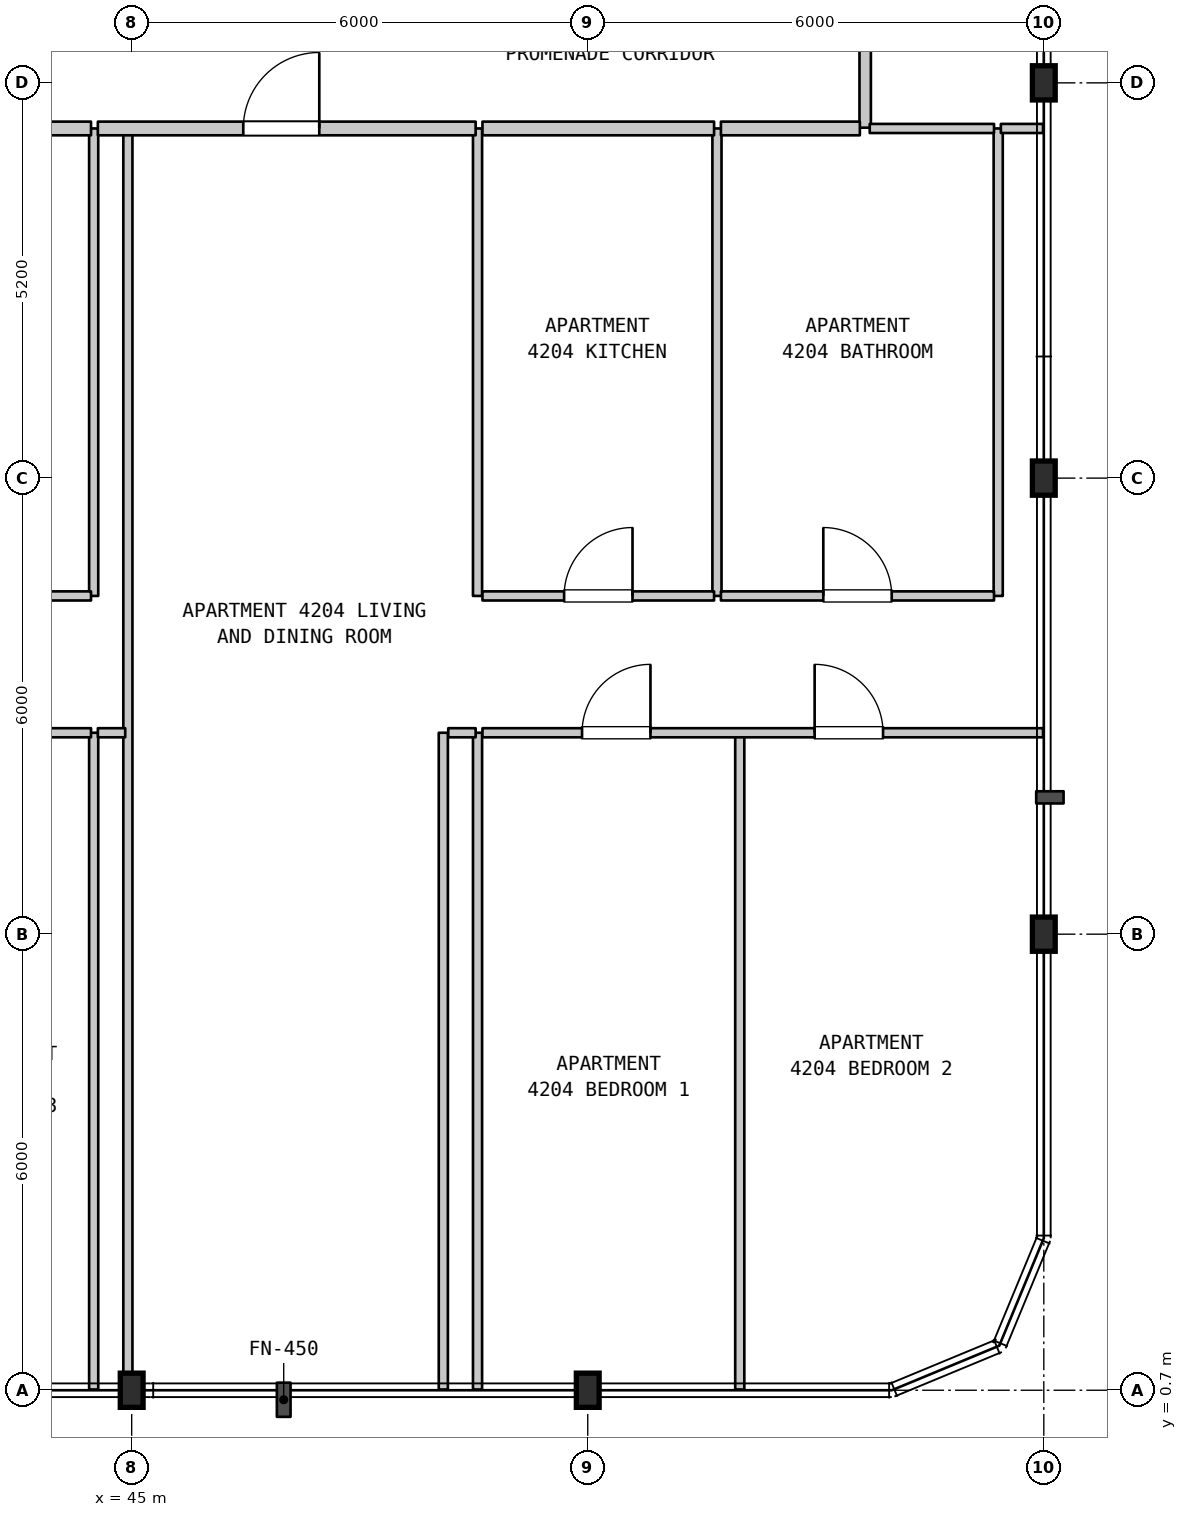
"""IFC4 building model, lengths in metres.
Left out: names, types, materials, properties, quantities, classifications, styles, units other than length and angle.
Written with IfcOpenShell. Run it as: python <this file> out.ifc"""

import sys

from ifc_helpers import new_model, si_unit, direction, frame, frame_2d, origin, origin_2d, place, context, subcontext, project, spatial, rectangle, i_section, extrude, element, fill, save


model = new_model("IFC4")
c1 = context("Model", 3, precision=1e-05, world=origin(), true_north=direction((0.0, 1.0)))
c2 = subcontext(c1, "Body", "Model", "MODEL_VIEW")
j1 = project(units=[si_unit("LENGTHUNIT", "METRE"), si_unit("PLANEANGLEUNIT", "RADIAN")], contexts=[c1])
p1 = place(None, origin())
s1 = spatial("IfcSite", under=j1, at=p1, CompositionType="ELEMENT")
p2 = place(p1, origin())
s2 = spatial("IfcBuilding", under=s1, at=p2, CompositionType="ELEMENT")
p3 = place(p2, frame((0.0, 0.0, 172.8)))
s3 = spatial("IfcBuildingStorey", under=s2, at=p3, CompositionType="ELEMENT", Elevation=172.8)
for number, where, z_axis, x_axis in (
    (1, (45.0, 0.7, 0.0), (0.0, 0.0, 1.0), (1.0, 0.0, 0.0)),
    (2, (51.0, 0.7, 0.0), (0.0, 0.0, 1.0), (1.0, 0.0, 0.0)),
    (3, (57.0, 6.7, 0.0), (0.0, 0.0, 1.0), (1.0, 0.0, 0.0)),
    (4, (57.0, 12.7, 0.0), (0.0, 0.0, 1.0), (1.0, 0.0, 0.0)),
    (5, (57.0, 17.9, 0.0), (0.0, 0.0, 1.0), (1.0, 0.0, 0.0)),
):
    element("IfcColumn", number, at=place(p3, frame(where, z_axis=z_axis, x_axis=x_axis)), inside=s3, PredefinedType="COLUMN", context=c2, shape_type="SweptSolid", body=[
        extrude(i_section(OverallWidth=0.3, OverallDepth=0.45, WebThickness=0.014, FlangeThickness=0.026, FilletRadius=0.027, at=origin_2d()), origin(), (0.0, 0.0, 1.0), 3.7),
    ])
p4 = place(p3, frame((44.5, 0.71, 0.0), z_axis=(0.0, 0.0, 1.0), x_axis=(0.0, 1.0, 0.0)))
e6 = element("IfcWall", 6, at=p4, inside=s3, PredefinedType="PARTITIONING", context=c2, shape_type="SweptSolid", body=[
    extrude(rectangle(XDim=8.64, YDim=0.12, at=frame_2d((4.32, 0.0))), origin(), (0.0, 0.0, 1.0), 3.39),
])
p5 = place(p3, frame((44.5, 11.15, 0.0), z_axis=(0.0, 0.0, 1.0), x_axis=(0.0, 1.0, 0.0)))
e7 = element("IfcWall", 7, at=p5, inside=s3, PredefinedType="PARTITIONING", context=c2, shape_type="SweptSolid", body=[
    extrude(rectangle(XDim=6.15, YDim=0.12, at=frame_2d((3.075, 0.0))), origin(), (0.0, 0.0, 1.0), 3.39),
])
p6 = place(p3, frame((44.95, 0.71, 0.0), z_axis=(0.0, 0.0, 1.0), x_axis=(0.0, 1.0, 0.0)))
e8 = element("IfcWall", 8, at=p6, inside=s3, PredefinedType="PARTITIONING", context=c2, shape_type="SweptSolid", body=[
    extrude(rectangle(XDim=16.59, YDim=0.12, at=frame_2d((8.295, 0.0))), origin(), (0.0, 0.0, 1.0), 3.39),
])
for number, where, z_axis, x_axis in (
    (9, (49.1, 0.71, 0.0), (0.0, 0.0, 1.0), (0.0, 1.0, 0.0)),
    (10, (49.55, 0.71, 0.0), (0.0, 0.0, 1.0), (0.0, 1.0, 0.0)),
):
    element("IfcWall", number, at=place(p3, frame(where, z_axis=z_axis, x_axis=x_axis)), inside=s3, PredefinedType="PARTITIONING", context=c2, shape_type="SweptSolid", body=[
        extrude(rectangle(XDim=8.64, YDim=0.12, at=frame_2d((4.32, 0.0))), origin(), (0.0, 0.0, 1.0), 3.39),
    ])
for number, where, z_axis, x_axis in (
    (11, (49.55, 11.15, 0.0), (0.0, 0.0, 1.0), (0.0, 1.0, 0.0)),
    (12, (52.7, 11.15, 0.0), (0.0, 0.0, 1.0), (0.0, 1.0, 0.0)),
):
    element("IfcWall", number, at=place(p3, frame(where, z_axis=z_axis, x_axis=x_axis)), inside=s3, PredefinedType="PARTITIONING", context=c2, shape_type="SweptSolid", body=[
        extrude(rectangle(XDim=6.15, YDim=0.12, at=frame_2d((3.075, 0.0))), origin(), (0.0, 0.0, 1.0), 3.39),
    ])
p7 = place(p3, frame((53.0, 0.71, 0.0), z_axis=(0.0, 0.0, 1.0), x_axis=(0.0, 1.0, 0.0)))
e13 = element("IfcWall", 13, at=p7, inside=s3, PredefinedType="PARTITIONING", context=c2, shape_type="SweptSolid", body=[
    extrude(rectangle(XDim=8.64, YDim=0.12, at=frame_2d((4.32, 0.0))), origin(), (0.0, 0.0, 1.0), 3.39),
])
p8 = place(p3, frame((54.65, 17.31, 0.0), z_axis=(0.0, 0.0, 1.0), x_axis=(0.0, 1.0, 0.0)))
e14 = element("IfcWall", 14, at=p8, inside=s3, PredefinedType="STANDARD", context=c2, shape_type="SweptSolid", body=[
    extrude(rectangle(XDim=2.19, YDim=0.15, at=frame_2d((1.095, 0.0))), origin(), (0.0, 0.0, 1.0), 3.39),
])
p9 = place(p3, frame((56.4, 11.15, 0.0), z_axis=(0.0, 0.0, 1.0), x_axis=(0.0, 1.0, 0.0)))
e15 = element("IfcWall", 15, at=p9, inside=s3, PredefinedType="PARTITIONING", context=c2, shape_type="SweptSolid", body=[
    extrude(rectangle(XDim=6.15, YDim=0.12, at=frame_2d((3.075, 0.0))), origin(), (0.0, 0.0, 1.0), 3.39),
])
p10 = place(p3, frame((37.425, 9.35, 0.0), z_axis=(0.0, 0.0, 1.0), x_axis=(1.0, 0.0, 0.0)))
e16 = element("IfcWall", 16, at=p10, inside=s3, PredefinedType="PARTITIONING", context=c2, shape_type="SweptSolid", body=[
    extrude(rectangle(XDim=7.04, YDim=0.12, at=frame_2d((3.52, 0.0))), origin(), (0.0, 0.0, 1.0), 3.39),
])
p11 = place(p10, frame((0.868, 0.0, 0.0)))
e17 = element("IfcOpeningElement", 17, at=p11, cuts=e16, PredefinedType="OPENING", context=c2, shape_type="SweptSolid", body=[
    extrude(rectangle(XDim=0.9, YDim=2.15, at=frame_2d((0.45, 1.075))), frame((0.0, 0.07, 0.0), z_axis=(0.0, -1.0, 0.0), x_axis=(1.0, 0.0, 0.0)), (0.0, 0.0, 1.0), 0.14),
])
p12 = place(p10, frame((2.999, 0.0, 0.0)))
e18 = element("IfcOpeningElement", 18, at=p12, cuts=e16, PredefinedType="OPENING", context=c2, shape_type="SweptSolid", body=[
    extrude(rectangle(XDim=0.9, YDim=2.15, at=frame_2d((0.45, 1.075))), frame((0.0, 0.07, 0.0), z_axis=(0.0, -1.0, 0.0), x_axis=(1.0, 0.0, 0.0)), (0.0, 0.0, 1.0), 0.14),
])
p13 = place(p10, frame((5.272, 0.0, 0.0)))
e19 = element("IfcOpeningElement", 19, at=p13, cuts=e16, PredefinedType="OPENING", context=c2, shape_type="SweptSolid", body=[
    extrude(rectangle(XDim=0.9, YDim=2.15, at=frame_2d((0.45, 1.075))), frame((0.0, 0.07, 0.0), z_axis=(0.0, -1.0, 0.0), x_axis=(1.0, 0.0, 0.0)), (0.0, 0.0, 1.0), 0.14),
])
p14 = place(p3, frame((44.555, 9.35, 0.0), z_axis=(0.0, 0.0, 1.0), x_axis=(1.0, 0.0, 0.0)))
e20 = element("IfcWall", 20, at=p14, inside=s3, PredefinedType="PARTITIONING", context=c2, shape_type="SweptSolid", body=[
    extrude(rectangle(XDim=0.36, YDim=0.12, at=frame_2d((0.18, 0.0))), origin(), (0.0, 0.0, 1.0), 3.39),
])
p15 = place(p3, frame((49.165, 9.35, 0.0), z_axis=(0.0, 0.0, 1.0), x_axis=(1.0, 0.0, 0.0)))
e21 = element("IfcWall", 21, at=p15, inside=s3, PredefinedType="PARTITIONING", context=c2, shape_type="SweptSolid", body=[
    extrude(rectangle(XDim=0.36, YDim=0.12, at=frame_2d((0.18, 0.0))), origin(), (0.0, 0.0, 1.0), 3.39),
])
p16 = place(p3, frame((49.615, 9.35, 0.0), z_axis=(0.0, 0.0, 1.0), x_axis=(1.0, 0.0, 0.0)))
e22 = element("IfcWall", 22, at=p16, inside=s3, PredefinedType="PARTITIONING", context=c2, shape_type="SweptSolid", body=[
    extrude(rectangle(XDim=7.375, YDim=0.12, at=frame_2d((3.688, 0.0))), origin(), (0.0, 0.0, 1.0), 3.39),
])
p17 = place(p16, frame((1.31, 0.0, 0.0)))
e23 = element("IfcOpeningElement", 23, at=p17, cuts=e22, PredefinedType="OPENING", context=c2, shape_type="SweptSolid", body=[
    extrude(rectangle(XDim=0.9, YDim=2.15, at=frame_2d((0.45, 1.075))), frame((0.0, 0.07, 0.0), z_axis=(0.0, -1.0, 0.0), x_axis=(1.0, 0.0, 0.0)), (0.0, 0.0, 1.0), 0.14),
])
p18 = place(p16, frame((4.37, 0.0, 0.0)))
e24 = element("IfcOpeningElement", 24, at=p18, cuts=e22, PredefinedType="OPENING", context=c2, shape_type="SweptSolid", body=[
    extrude(rectangle(XDim=0.9, YDim=2.15, at=frame_2d((0.45, 1.075))), frame((0.0, 0.07, 0.0), z_axis=(0.0, -1.0, 0.0), x_axis=(1.0, 0.0, 0.0)), (0.0, 0.0, 1.0), 0.14),
])
p19 = place(p3, frame((40.705, 11.15, 0.0), z_axis=(0.0, 0.0, 1.0), x_axis=(1.0, 0.0, 0.0)))
e25 = element("IfcWall", 25, at=p19, inside=s3, PredefinedType="PARTITIONING", context=c2, shape_type="SweptSolid", body=[
    extrude(rectangle(XDim=3.76, YDim=0.12, at=frame_2d((1.88, 0.0))), origin(), (0.0, 0.0, 1.0), 3.39),
])
p20 = place(p19, frame((1.358, 0.0, 0.0)))
e26 = element("IfcOpeningElement", 26, at=p20, cuts=e25, PredefinedType="OPENING", context=c2, shape_type="SweptSolid", body=[
    extrude(rectangle(XDim=0.9, YDim=2.1, at=frame_2d((0.45, 1.05))), frame((0.0, 0.07, 0.0), z_axis=(0.0, -1.0, 0.0), x_axis=(1.0, 0.0, 0.0)), (0.0, 0.0, 1.0), 0.14),
])
p21 = place(p3, frame((49.615, 11.15, 0.0), z_axis=(0.0, 0.0, 1.0), x_axis=(1.0, 0.0, 0.0)))
e27 = element("IfcWall", 27, at=p21, inside=s3, PredefinedType="PARTITIONING", context=c2, shape_type="SweptSolid", body=[
    extrude(rectangle(XDim=3.047, YDim=0.12, at=frame_2d((1.523, 0.0))), origin(), (0.0, 0.0, 1.0), 3.39),
])
p22 = place(p21, frame((1.074, 0.0, 0.0)))
e28 = element("IfcOpeningElement", 28, at=p22, cuts=e27, PredefinedType="OPENING", context=c2, shape_type="SweptSolid", body=[
    extrude(rectangle(XDim=0.9, YDim=2.15, at=frame_2d((0.45, 1.075))), frame((0.0, 0.07, 0.0), z_axis=(0.0, -1.0, 0.0), x_axis=(1.0, 0.0, 0.0)), (0.0, 0.0, 1.0), 0.14),
])
p23 = place(p3, frame((52.752, 11.15, 0.0), z_axis=(0.0, 0.0, 1.0), x_axis=(1.0, 0.0, 0.0)))
e29 = element("IfcWall", 29, at=p23, inside=s3, PredefinedType="PARTITIONING", context=c2, shape_type="SweptSolid", body=[
    extrude(rectangle(XDim=3.593, YDim=0.12, at=frame_2d((1.796, 0.0))), origin(), (0.0, 0.0, 1.0), 3.39),
])
p24 = place(p23, frame((1.347, 0.0, 0.0)))
e30 = element("IfcOpeningElement", 30, at=p24, cuts=e29, PredefinedType="OPENING", context=c2, shape_type="SweptSolid", body=[
    extrude(rectangle(XDim=0.9, YDim=2.1, at=frame_2d((0.45, 1.05))), frame((0.0, 0.07, 0.0), z_axis=(0.0, -1.0, 0.0), x_axis=(1.0, 0.0, 0.0)), (0.0, 0.0, 1.0), 0.14),
])
p25 = place(p3, frame((40.705, 17.3, 0.0), z_axis=(0.0, 0.0, 1.0), x_axis=(1.0, 0.0, 0.0)))
e31 = element("IfcWall", 31, at=p25, inside=s3, PredefinedType="STANDARD", context=c2, shape_type="SweptSolid", body=[
    extrude(rectangle(XDim=3.76, YDim=0.18, at=frame_2d((1.88, 0.0))), origin(), (0.0, 0.0, 1.0), 3.39),
])
p26 = place(p3, frame((44.555, 17.3, 0.0), z_axis=(0.0, 0.0, 1.0), x_axis=(1.0, 0.0, 0.0)))
e32 = element("IfcWall", 32, at=p26, inside=s3, PredefinedType="STANDARD", context=c2, shape_type="SweptSolid", body=[
    extrude(rectangle(XDim=4.97, YDim=0.18, at=frame_2d((2.485, 0.0))), origin(), (0.0, 0.0, 1.0), 3.39),
])
p27 = place(p26, frame((1.913, 0.0, 0.0)))
e33 = element("IfcOpeningElement", 33, at=p27, cuts=e32, PredefinedType="OPENING", context=c2, shape_type="SweptSolid", body=[
    extrude(rectangle(XDim=1.0, YDim=2.15, at=frame_2d((0.5, 1.075))), frame((0.0, 0.1, 0.0), z_axis=(0.0, -1.0, 0.0), x_axis=(1.0, 0.0, 0.0)), (0.0, 0.0, 1.0), 0.2),
])
p28 = place(p3, frame((49.615, 17.3, 0.0), z_axis=(0.0, 0.0, 1.0), x_axis=(1.0, 0.0, 0.0)))
e34 = element("IfcWall", 34, at=p28, inside=s3, PredefinedType="STANDARD", context=c2, shape_type="SweptSolid", body=[
    extrude(rectangle(XDim=3.047, YDim=0.18, at=frame_2d((1.523, 0.0))), origin(), (0.0, 0.0, 1.0), 3.39),
])
p29 = place(p3, frame((52.752, 17.3, 0.0), z_axis=(0.0, 0.0, 1.0), x_axis=(1.0, 0.0, 0.0)))
e35 = element("IfcWall", 35, at=p29, inside=s3, PredefinedType="STANDARD", context=c2, shape_type="SweptSolid", body=[
    extrude(rectangle(XDim=1.828, YDim=0.18, at=frame_2d((0.914, 0.0))), origin(), (0.0, 0.0, 1.0), 3.39),
])
p30 = place(p3, frame((54.71, 17.3, 0.0), z_axis=(0.0, 0.0, 1.0), x_axis=(1.0, 0.0, 0.0)))
e36 = element("IfcWall", 36, at=p30, inside=s3, PredefinedType="PARTITIONING", context=c2, shape_type="SweptSolid", body=[
    extrude(rectangle(XDim=1.635, YDim=0.12, at=frame_2d((0.817, 0.0))), origin(), (0.0, 0.0, 1.0), 3.39),
])
p31 = place(p3, frame((56.435, 17.3, 0.0), z_axis=(0.0, 0.0, 1.0), x_axis=(1.0, 0.0, 0.0)))
e37 = element("IfcWall", 37, at=p31, inside=s3, PredefinedType="PARTITIONING", context=c2, shape_type="SweptSolid", body=[
    extrude(rectangle(XDim=0.555, YDim=0.12, at=frame_2d((0.277, 0.0))), origin(), (0.0, 0.0, 1.0), 3.39),
])
p32 = place(p17, origin())
e38 = element("IfcDoor", 38, at=p32, inside=s3, OperationType="SINGLE_SWING_RIGHT", PredefinedType="DOOR", context=c2, shape_type="SweptSolid", body=[
    extrude(rectangle(XDim=0.9, YDim=2.15, at=frame_2d((0.45, 1.075))), frame((0.0, 0.025, 0.0), z_axis=(0.0, -1.0, 0.0), x_axis=(1.0, 0.0, 0.0)), (0.0, 0.0, 1.0), 0.05),
])
fill(e23, e38)
p33 = place(p18, origin())
e39 = element("IfcDoor", 39, at=p33, inside=s3, OperationType="SINGLE_SWING_LEFT", PredefinedType="DOOR", context=c2, shape_type="SweptSolid", body=[
    extrude(rectangle(XDim=0.9, YDim=2.15, at=frame_2d((0.45, 1.075))), frame((0.0, 0.025, 0.0), z_axis=(0.0, -1.0, 0.0), x_axis=(1.0, 0.0, 0.0)), (0.0, 0.0, 1.0), 0.05),
])
fill(e24, e39)
p34 = place(p22, origin())
e40 = element("IfcDoor", 40, at=p34, inside=s3, OperationType="SINGLE_SWING_RIGHT", PredefinedType="DOOR", context=c2, shape_type="SweptSolid", body=[
    extrude(rectangle(XDim=0.9, YDim=2.15, at=frame_2d((0.45, 1.075))), frame((0.0, 0.025, 0.0), z_axis=(0.0, -1.0, 0.0), x_axis=(1.0, 0.0, 0.0)), (0.0, 0.0, 1.0), 0.05),
])
fill(e28, e40)
p35 = place(p24, origin())
e41 = element("IfcDoor", 41, at=p35, inside=s3, OperationType="SINGLE_SWING_LEFT", PredefinedType="DOOR", context=c2, shape_type="SweptSolid", body=[
    extrude(rectangle(XDim=0.9, YDim=2.1, at=frame_2d((0.45, 1.05))), frame((0.0, 0.025, 0.0), z_axis=(0.0, -1.0, 0.0), x_axis=(1.0, 0.0, 0.0)), (0.0, 0.0, 1.0), 0.05),
])
fill(e30, e41)
p36 = place(p27, origin())
e42 = element("IfcDoor", 42, at=p36, inside=s3, OperationType="SINGLE_SWING_RIGHT", PredefinedType="DOOR", context=c2, shape_type="SweptSolid", body=[
    extrude(rectangle(XDim=1.0, YDim=2.15, at=frame_2d((0.5, 1.075))), frame((0.0, 0.025, 0.0), z_axis=(0.0, -1.0, 0.0), x_axis=(1.0, 0.0, 0.0)), (0.0, 0.0, 1.0), 0.05),
])
fill(e33, e42)
save(model, sys.argv[1])
